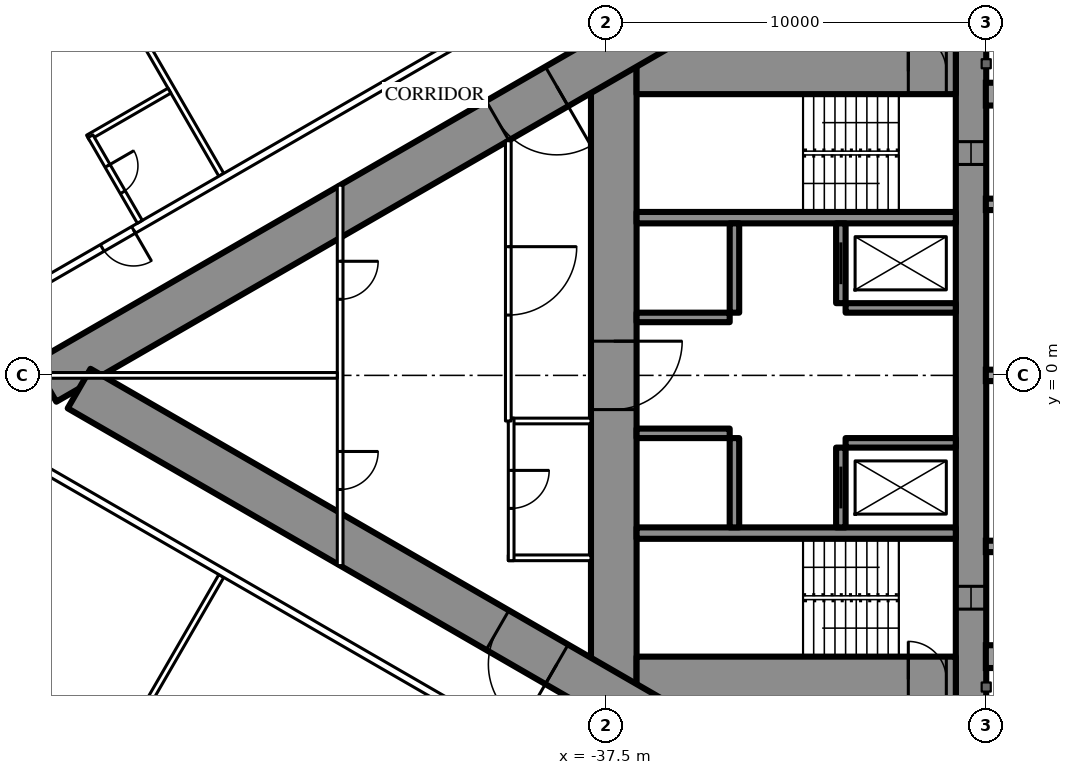
"""IFC4 building model, lengths in metres.
Left out: names, types, materials, properties, quantities, classifications, styles, units other than length and angle.
Written with IfcOpenShell. Run it as: python <this file> out.ifc"""

import sys

from ifc_helpers import new_model, si_unit, direction, frame, frame_2d, origin, place, context, subcontext, project, spatial, rectangle, extrude, element, fill, save


model = new_model("IFC4")
c1 = context("Model", 3, precision=1e-05, world=origin(), true_north=direction((0.0, 1.0)))
c2 = subcontext(c1, "Body", "Model", "MODEL_VIEW")
j1 = project(units=[si_unit("LENGTHUNIT", "METRE"), si_unit("PLANEANGLEUNIT", "RADIAN")], contexts=[c1])
p1 = place(None, origin())
s1 = spatial("IfcSite", under=j1, at=p1, CompositionType="ELEMENT")
p2 = place(p1, origin())
s2 = spatial("IfcBuilding", under=s1, at=p2, CompositionType="ELEMENT")
p3 = place(p2, frame((0.0, 0.0, 63.5)))
s3 = spatial("IfcBuildingStorey", under=s2, at=p3, CompositionType="ELEMENT", Elevation=63.5)
p4 = place(p3, frame((-27.9, 8.6, 0.0), z_axis=(0.0, 0.0, 1.0), x_axis=(0.0, -1.0, 0.0)))
e1 = element("IfcWall", 1, at=p4, inside=s3, PredefinedType="SHEAR", context=c2, shape_type="SweptSolid", body=[
    extrude(rectangle(XDim=17.2, YDim=0.8, at=frame_2d((8.6, 0.0))), origin(), (0.0, 0.0, 1.0), 3.5),
])
p5 = place(p4, frame((2.45, 0.0, 0.6)))
e2 = element("IfcOpeningElement", 2, at=p5, cuts=e1, PredefinedType="OPENING", context=c2, shape_type="SweptSolid", body=[
    extrude(rectangle(XDim=0.6, YDim=2.1, at=frame_2d((0.3, 1.05))), frame((0.0, 0.41, 0.0), z_axis=(0.0, -1.0, 0.0), x_axis=(1.0, 0.0, 0.0)), (0.0, 0.0, 1.0), 0.82),
])
p6 = place(p4, frame((14.15, 0.0, 0.6)))
e3 = element("IfcOpeningElement", 3, at=p6, cuts=e1, PredefinedType="OPENING", context=c2, shape_type="SweptSolid", body=[
    extrude(rectangle(XDim=0.6, YDim=2.1, at=frame_2d((0.3, 1.05))), frame((0.0, 0.41, 0.0), z_axis=(0.0, -1.0, 0.0), x_axis=(1.0, 0.0, 0.0)), (0.0, 0.0, 1.0), 0.82),
])
p7 = place(p3, frame((-37.3, 8.6, 0.0), z_axis=(0.0, 0.0, 1.0), x_axis=(0.0, -1.0, 0.0)))
e4 = element("IfcWall", 4, at=p7, inside=s3, PredefinedType="SHEAR", context=c2, shape_type="SweptSolid", body=[
    extrude(rectangle(XDim=17.2, YDim=1.2, at=frame_2d((8.6, 0.0))), origin(), (0.0, 0.0, 1.0), 3.5),
])
p8 = place(p7, frame((7.7, 0.0, 0.0)))
e5 = element("IfcOpeningElement", 5, at=p8, cuts=e4, PredefinedType="OPENING", context=c2, shape_type="SweptSolid", body=[
    extrude(rectangle(XDim=1.8, YDim=2.2, at=frame_2d((0.9, 1.1))), frame((0.0, 0.61, 0.0), z_axis=(0.0, -1.0, 0.0), x_axis=(1.0, 0.0, 0.0)), (0.0, 0.0, 1.0), 1.22),
])
p9 = place(p3, frame((-28.3, 8.0, 0.0), z_axis=(0.0, 0.0, 1.0), x_axis=(-1.0, 0.0, 0.0)))
e6 = element("IfcWall", 6, at=p9, inside=s3, PredefinedType="SHEAR", context=c2, shape_type="SweptSolid", body=[
    extrude(rectangle(XDim=8.4, YDim=1.2, at=frame_2d((4.2, 0.0))), origin(), (0.0, 0.0, 1.0), 3.5),
])
p10 = place(p9, frame((0.25, 0.0, 0.0)))
e7 = element("IfcOpeningElement", 7, at=p10, cuts=e6, PredefinedType="OPENING", context=c2, shape_type="SweptSolid", body=[
    extrude(rectangle(XDim=1.0, YDim=2.2, at=frame_2d((0.5, 1.1))), frame((0.0, 0.61, 0.0), z_axis=(0.0, -1.0, 0.0), x_axis=(1.0, 0.0, 0.0)), (0.0, 0.0, 1.0), 1.22),
])
p11 = place(p3, frame((-28.3, -8.0, 0.0), z_axis=(0.0, 0.0, 1.0), x_axis=(-1.0, 0.0, 0.0)))
e8 = element("IfcWall", 8, at=p11, inside=s3, PredefinedType="SHEAR", context=c2, shape_type="SweptSolid", body=[
    extrude(rectangle(XDim=8.4, YDim=1.2, at=frame_2d((4.2, 0.0))), origin(), (0.0, 0.0, 1.0), 3.5),
])
p12 = place(p11, frame((0.25, 0.0, 0.0)))
e9 = element("IfcOpeningElement", 9, at=p12, cuts=e8, PredefinedType="OPENING", context=c2, shape_type="SweptSolid", body=[
    extrude(rectangle(XDim=1.0, YDim=2.2, at=frame_2d((0.5, 1.1))), frame((0.0, 0.61, 0.0), z_axis=(0.0, -1.0, 0.0), x_axis=(1.0, 0.0, 0.0)), (0.0, 0.0, 1.0), 1.22),
])
for number, where, z_axis, x_axis in (
    (10, (-28.3, 4.15, 0.0), (0.0, 0.0, 1.0), (-1.0, 0.0, 0.0)),
    (11, (-28.3, -4.15, 0.0), (0.0, 0.0, 1.0), (-1.0, 0.0, 0.0)),
):
    element("IfcWall", number, at=place(p3, frame(where, z_axis=z_axis, x_axis=x_axis)), inside=s3, PredefinedType="SHEAR", context=c2, shape_type="SweptSolid", body=[
        extrude(rectangle(XDim=8.4, YDim=0.3, at=frame_2d((4.2, 0.0))), origin(), (0.0, 0.0, 1.0), 3.5),
    ])
p13 = place(p3, frame((-31.325, 4.0, 0.0), z_axis=(0.0, 0.0, 1.0), x_axis=(0.0, -1.0, 0.0)))
e12 = element("IfcWall", 12, at=p13, inside=s3, PredefinedType="SHEAR", context=c2, shape_type="SweptSolid", body=[
    extrude(rectangle(XDim=2.1, YDim=0.25, at=frame_2d((1.05, 0.0))), origin(), (0.0, 0.0, 1.0), 3.5),
])
p14 = place(p13, frame((0.5, 0.0, 0.0)))
e13 = element("IfcOpeningElement", 13, at=p14, cuts=e12, PredefinedType="OPENING", context=c2, shape_type="SweptSolid", body=[
    extrude(rectangle(XDim=1.1, YDim=2.2, at=frame_2d((0.55, 1.1))), frame((0.0, 0.135, 0.0), z_axis=(0.0, -1.0, 0.0), x_axis=(1.0, 0.0, 0.0)), (0.0, 0.0, 1.0), 0.27),
])
p15 = place(p3, frame((-34.125, 4.0, 0.0), z_axis=(0.0, 0.0, 1.0), x_axis=(0.0, -1.0, 0.0)))
e14 = element("IfcWall", 14, at=p15, inside=s3, PredefinedType="SHEAR", context=c2, shape_type="SweptSolid", body=[
    extrude(rectangle(XDim=2.35, YDim=0.25, at=frame_2d((1.175, 0.0))), origin(), (0.0, 0.0, 1.0), 3.5),
])
p16 = place(p3, frame((-28.3, 1.775, 0.0), z_axis=(0.0, 0.0, 1.0), x_axis=(-1.0, 0.0, 0.0)))
e15 = element("IfcWall", 15, at=p16, inside=s3, PredefinedType="SHEAR", context=c2, shape_type="SweptSolid", body=[
    extrude(rectangle(XDim=2.9, YDim=0.25, at=frame_2d((1.45, 0.0))), origin(), (0.0, 0.0, 1.0), 3.5),
])
p17 = place(p3, frame((-34.25, 1.525, 0.0), z_axis=(0.0, 0.0, 1.0), x_axis=(-1.0, 0.0, 0.0)))
e16 = element("IfcWall", 16, at=p17, inside=s3, PredefinedType="SHEAR", context=c2, shape_type="SweptSolid", body=[
    extrude(rectangle(XDim=2.45, YDim=0.25, at=frame_2d((1.225, 0.0))), origin(), (0.0, 0.0, 1.0), 3.5),
])
p18 = place(p3, frame((-31.325, -1.9, 0.0), z_axis=(0.0, 0.0, 1.0), x_axis=(0.0, -1.0, 0.0)))
e17 = element("IfcWall", 17, at=p18, inside=s3, PredefinedType="SHEAR", context=c2, shape_type="SweptSolid", body=[
    extrude(rectangle(XDim=2.1, YDim=0.25, at=frame_2d((1.05, 0.0))), origin(), (0.0, 0.0, 1.0), 3.5),
])
p19 = place(p18, frame((0.5, 0.0, 0.0)))
e18 = element("IfcOpeningElement", 18, at=p19, cuts=e17, PredefinedType="OPENING", context=c2, shape_type="SweptSolid", body=[
    extrude(rectangle(XDim=1.1, YDim=2.2, at=frame_2d((0.55, 1.1))), frame((0.0, 0.135, 0.0), z_axis=(0.0, -1.0, 0.0), x_axis=(1.0, 0.0, 0.0)), (0.0, 0.0, 1.0), 0.27),
])
p20 = place(p3, frame((-34.125, -1.65, 0.0), z_axis=(0.0, 0.0, 1.0), x_axis=(0.0, -1.0, 0.0)))
e19 = element("IfcWall", 19, at=p20, inside=s3, PredefinedType="SHEAR", context=c2, shape_type="SweptSolid", body=[
    extrude(rectangle(XDim=2.35, YDim=0.25, at=frame_2d((1.175, 0.0))), origin(), (0.0, 0.0, 1.0), 3.5),
])
p21 = place(p3, frame((-28.3, -1.775, 0.0), z_axis=(0.0, 0.0, 1.0), x_axis=(-1.0, 0.0, 0.0)))
e20 = element("IfcWall", 20, at=p21, inside=s3, PredefinedType="SHEAR", context=c2, shape_type="SweptSolid", body=[
    extrude(rectangle(XDim=2.9, YDim=0.25, at=frame_2d((1.45, 0.0))), origin(), (0.0, 0.0, 1.0), 3.5),
])
p22 = place(p3, frame((-34.25, -1.525, 0.0), z_axis=(0.0, 0.0, 1.0), x_axis=(-1.0, 0.0, 0.0)))
e21 = element("IfcWall", 21, at=p22, inside=s3, PredefinedType="SHEAR", context=c2, shape_type="SweptSolid", body=[
    extrude(rectangle(XDim=2.45, YDim=0.25, at=frame_2d((1.225, 0.0))), origin(), (0.0, 0.0, 1.0), 3.5),
])
p23 = place(p3, frame((-27.2, 14.3, 0.0), z_axis=(0.0, 0.0, 1.0), x_axis=(-0.866026593062, -0.499997940104, 0.0)))
e22 = element("IfcWall", 22, at=p23, inside=s3, PredefinedType="SHEAR", context=c2, shape_type="SweptSolid", body=[
    extrude(rectangle(XDim=28.946, YDim=1.2, at=frame_2d((14.473, 0.0))), origin(), (0.0, 0.0, 1.0), 3.5),
])
p24 = place(p23, frame((4.6, 0.0, 0.0)))
e23 = element("IfcOpeningElement", 23, at=p24, cuts=e22, PredefinedType="OPENING", context=c2, shape_type="SweptSolid", body=[
    extrude(rectangle(XDim=1.0, YDim=2.2, at=frame_2d((0.5, 1.1))), frame((0.0, 0.61, 0.0), z_axis=(0.0, -1.0, 0.0), x_axis=(1.0, 0.0, 0.0)), (0.0, 0.0, 1.0), 1.22),
])
p25 = place(p23, frame((13.395, 0.0, 0.0)))
e24 = element("IfcOpeningElement", 24, at=p25, cuts=e22, PredefinedType="OPENING", context=c2, shape_type="SweptSolid", body=[
    extrude(rectangle(XDim=1.8, YDim=2.2, at=frame_2d((0.9, 1.1))), frame((0.0, 0.61, 0.0), z_axis=(0.0, -1.0, 0.0), x_axis=(1.0, 0.0, 0.0)), (0.0, 0.0, 1.0), 1.22),
])
p26 = place(p3, frame((-27.2, -14.3, 0.0), z_axis=(0.0, 0.0, 1.0), x_axis=(-0.866024021859, 0.500002393557, 0.0)))
e25 = element("IfcWall", 25, at=p26, inside=s3, PredefinedType="SHEAR", context=c2, shape_type="SweptSolid", body=[
    extrude(rectangle(XDim=27.907, YDim=1.2, at=frame_2d((13.954, 0.0))), origin(), (0.0, 0.0, 1.0), 3.5),
])
p27 = place(p26, frame((4.6, 0.0, 0.0)))
e26 = element("IfcOpeningElement", 26, at=p27, cuts=e25, PredefinedType="OPENING", context=c2, shape_type="SweptSolid", body=[
    extrude(rectangle(XDim=1.0, YDim=2.2, at=frame_2d((0.5, 1.1))), frame((0.0, 0.61, 0.0), z_axis=(0.0, -1.0, 0.0), x_axis=(1.0, 0.0, 0.0)), (0.0, 0.0, 1.0), 1.22),
])
p28 = place(p26, frame((13.395, 0.0, 0.0)))
e27 = element("IfcOpeningElement", 27, at=p28, cuts=e25, PredefinedType="OPENING", context=c2, shape_type="SweptSolid", body=[
    extrude(rectangle(XDim=1.8, YDim=2.2, at=frame_2d((0.9, 1.1))), frame((0.0, 0.61, 0.0), z_axis=(0.0, -1.0, 0.0), x_axis=(1.0, 0.0, 0.0)), (0.0, 0.0, 1.0), 1.22),
])
for number, where, z_axis, x_axis in (
    (28, (-47.627, 5.278, 0.0), (0.0, 0.0, 1.0), (-0.5, 0.866, 0.0)),
    (29, (-47.627, -5.278, 0.0), (0.0, 0.0, 1.0), (-0.5, -0.866, 0.0)),
):
    element("IfcWall", number, at=place(p3, frame(where, z_axis=z_axis, x_axis=x_axis)), inside=s3, PredefinedType="PARTITIONING", context=c2, shape_type="SweptSolid", body=[
        extrude(rectangle(XDim=9.51, YDim=0.15, at=frame_2d((4.755, 0.0))), origin(), (0.0, 0.0, 1.0), 2.25),
    ])
p29 = place(p3, frame((-37.7, 10.894, 0.0), z_axis=(0.0, 0.0, 1.0), x_axis=(-0.866027905338, -0.499995667157, 0.0)))
e30 = element("IfcWall", 30, at=p29, inside=s3, PredefinedType="PARTITIONING", context=c2, shape_type="SweptSolid", body=[
    extrude(rectangle(XDim=21.787, YDim=0.2, at=frame_2d((10.894, 0.0))), origin(), (0.0, 0.0, 1.0), 3.25),
])
p30 = place(p29, frame((14.13, 0.0, 0.0)))
e31 = element("IfcOpeningElement", 31, at=p30, cuts=e30, PredefinedType="OPENING", context=c2, shape_type="SweptSolid", body=[
    extrude(rectangle(XDim=0.95, YDim=2.2, at=frame_2d((0.475, 1.1))), frame((0.0, 0.11, 0.0), z_axis=(0.0, -1.0, 0.0), x_axis=(1.0, 0.0, 0.0)), (0.0, 0.0, 1.0), 0.22),
])
p31 = place(p29, frame((20.058, 0.0, 0.0)))
e32 = element("IfcOpeningElement", 32, at=p31, cuts=e30, PredefinedType="OPENING", context=c2, shape_type="SweptSolid", body=[
    extrude(rectangle(XDim=0.95, YDim=2.2, at=frame_2d((0.475, 1.1))), frame((0.0, 0.11, 0.0), z_axis=(0.0, -1.0, 0.0), x_axis=(1.0, 0.0, 0.0)), (0.0, 0.0, 1.0), 0.22),
])
p32 = place(p29, frame((0.6, 0.0, 0.0)))
e33 = element("IfcOpeningElement", 33, at=p32, cuts=e30, PredefinedType="OPENING", context=c2, shape_type="SweptSolid", body=[
    extrude(rectangle(XDim=0.95, YDim=2.2, at=frame_2d((0.475, 1.1))), frame((0.0, 0.11, 0.0), z_axis=(0.0, -1.0, 0.0), x_axis=(1.0, 0.0, 0.0)), (0.0, 0.0, 1.0), 0.22),
])
p33 = place(p3, frame((-36.92, -11.344, 0.0), z_axis=(0.0, 0.0, 1.0), x_axis=(-0.866028313256, 0.499994960614, 0.0)))
e34 = element("IfcWall", 34, at=p33, inside=s3, PredefinedType="PARTITIONING", context=c2, shape_type="SweptSolid", body=[
    extrude(rectangle(XDim=22.568, YDim=0.2, at=frame_2d((11.284, 0.0))), origin(), (0.0, 0.0, 1.0), 3.25),
])
p34 = place(p33, frame((18.668, 0.0, 0.0)))
e35 = element("IfcOpeningElement", 35, at=p34, cuts=e34, PredefinedType="OPENING", context=c2, shape_type="SweptSolid", body=[
    extrude(rectangle(XDim=0.95, YDim=2.2, at=frame_2d((0.475, 1.1))), frame((0.0, 0.11, 0.0), z_axis=(0.0, -1.0, 0.0), x_axis=(1.0, 0.0, 0.0)), (0.0, 0.0, 1.0), 0.22),
])
p35 = place(p33, frame((3.35, 0.0, 0.0)))
e36 = element("IfcOpeningElement", 36, at=p35, cuts=e34, PredefinedType="OPENING", context=c2, shape_type="SweptSolid", body=[
    extrude(rectangle(XDim=1.0, YDim=2.2, at=frame_2d((0.5, 1.1))), frame((0.0, 0.11, 0.0), z_axis=(0.0, -1.0, 0.0), x_axis=(1.0, 0.0, 0.0)), (0.0, 0.0, 1.0), 0.22),
])
p36 = place(p3, frame((-48.992, 7.492, 0.0), z_axis=(0.0, 0.0, 1.0), x_axis=(-0.866031185235, -0.4999899861, 0.0)))
e37 = element("IfcWall", 37, at=p36, inside=s3, PredefinedType="PARTITIONING", context=c2, shape_type="SweptSolid", body=[
    extrude(rectangle(XDim=2.475, YDim=0.15, at=frame_2d((1.238, 0.0))), origin(), (0.0, 0.0, 1.0), 3.25),
])
p37 = place(p3, frame((-49.77, 4.04, 0.0), z_axis=(0.0, 0.0, 1.0), x_axis=(-0.500006934395, 0.866021400173, 0.0)))
e38 = element("IfcWall", 38, at=p37, inside=s3, PredefinedType="PARTITIONING", context=c2, shape_type="SweptSolid", body=[
    extrude(rectangle(XDim=2.6, YDim=0.15, at=frame_2d((1.3, 0.0))), origin(), (0.0, 0.0, 1.0), 3.25),
])
p38 = place(p37, frame((0.9, 0.0, 0.0)))
e39 = element("IfcOpeningElement", 39, at=p38, cuts=e38, PredefinedType="OPENING", context=c2, shape_type="SweptSolid", body=[
    extrude(rectangle(XDim=0.8, YDim=2.2, at=frame_2d((0.4, 1.1))), frame((0.0, 0.085, 0.0), z_axis=(0.0, -1.0, 0.0), x_axis=(1.0, 0.0, 0.0)), (0.0, 0.0, 1.0), 0.17),
])
for number, where, z_axis, x_axis in (
    (40, (-37.9, -1.2, 0.0), (0.0, 0.0, 1.0), (-1.0, 0.0, 0.0)),
    (41, (-37.9, -4.8, 0.0), (0.0, 0.0, 1.0), (-1.0, 0.0, 0.0)),
):
    element("IfcWall", number, at=place(p3, frame(where, z_axis=z_axis, x_axis=x_axis)), inside=s3, PredefinedType="PARTITIONING", context=c2, shape_type="SweptSolid", body=[
        extrude(rectangle(XDim=2.175, YDim=0.15, at=frame_2d((1.087, 0.0))), origin(), (0.0, 0.0, 1.0), 3.25),
    ])
p39 = place(p3, frame((-40.0, -1.125, 0.0), z_axis=(0.0, 0.0, 1.0), x_axis=(0.0, -1.0, 0.0)))
e42 = element("IfcWall", 42, at=p39, inside=s3, PredefinedType="PARTITIONING", context=c2, shape_type="SweptSolid", body=[
    extrude(rectangle(XDim=3.75, YDim=0.15, at=frame_2d((1.875, 0.0))), origin(), (0.0, 0.0, 1.0), 3.25),
])
p40 = place(p39, frame((1.375, 0.0, 0.0)))
e43 = element("IfcOpeningElement", 43, at=p40, cuts=e42, PredefinedType="OPENING", context=c2, shape_type="SweptSolid", body=[
    extrude(rectangle(XDim=1.0, YDim=2.2, at=frame_2d((0.5, 1.1))), frame((0.0, 0.085, 0.0), z_axis=(0.0, -1.0, 0.0), x_axis=(1.0, 0.0, 0.0)), (0.0, 0.0, 1.0), 0.17),
])
p41 = place(p3, frame((-40.075, 6.174, 0.0), z_axis=(0.0, 0.0, 1.0), x_axis=(0.0, -1.0, 0.0)))
e44 = element("IfcWall", 44, at=p41, inside=s3, PredefinedType="PARTITIONING", context=c2, shape_type="SweptSolid", body=[
    extrude(rectangle(XDim=7.374, YDim=0.15, at=frame_2d((3.687, 0.0))), origin(), (0.0, 0.0, 1.0), 3.25),
])
p42 = place(p41, frame((2.787, 0.0, 0.0)))
e45 = element("IfcOpeningElement", 45, at=p42, cuts=e44, PredefinedType="OPENING", context=c2, shape_type="SweptSolid", body=[
    extrude(rectangle(XDim=1.8, YDim=2.2, at=frame_2d((0.9, 1.1))), frame((0.0, 0.085, 0.0), z_axis=(0.0, -1.0, 0.0), x_axis=(1.0, 0.0, 0.0)), (0.0, 0.0, 1.0), 0.17),
])
p43 = place(p3, frame((-44.5, 5.005, 0.0), z_axis=(0.0, 0.0, 1.0), x_axis=(0.0, -1.0, 0.0)))
e46 = element("IfcWall", 46, at=p43, inside=s3, PredefinedType="PARTITIONING", context=c2, shape_type="SweptSolid", body=[
    extrude(rectangle(XDim=10.009, YDim=0.15, at=frame_2d((5.005, 0.0))), origin(), (0.0, 0.0, 1.0), 2.45),
])
p44 = place(p43, frame((2.002, 0.0, 0.0)))
e47 = element("IfcOpeningElement", 47, at=p44, cuts=e46, PredefinedType="OPENING", context=c2, shape_type="SweptSolid", body=[
    extrude(rectangle(XDim=1.0, YDim=2.2, at=frame_2d((0.5, 1.1))), frame((0.0, 0.085, 0.0), z_axis=(0.0, -1.0, 0.0), x_axis=(1.0, 0.0, 0.0)), (0.0, 0.0, 1.0), 0.17),
])
p45 = place(p43, frame((7.007, 0.0, 0.0)))
e48 = element("IfcOpeningElement", 48, at=p45, cuts=e46, PredefinedType="OPENING", context=c2, shape_type="SweptSolid", body=[
    extrude(rectangle(XDim=1.0, YDim=2.2, at=frame_2d((0.5, 1.1))), frame((0.0, 0.085, 0.0), z_axis=(0.0, -1.0, 0.0), x_axis=(1.0, 0.0, 0.0)), (0.0, 0.0, 1.0), 0.17),
])
p46 = place(p3, frame((-44.575, 0.0, 0.0), z_axis=(0.0, 0.0, 1.0), x_axis=(-1.0, 0.0, 0.0)))
e49 = element("IfcWall", 49, at=p46, inside=s3, PredefinedType="PARTITIONING", context=c2, shape_type="SweptSolid", body=[
    extrude(rectangle(XDim=8.593, YDim=0.15, at=frame_2d((4.297, 0.0))), origin(), (0.0, 0.0, 1.0), 2.25),
])
p47 = place(p38, origin())
e50 = element("IfcDoor", 50, at=p47, inside=s3, OperationType="SINGLE_SWING_RIGHT", PredefinedType="DOOR", context=c2, shape_type="SweptSolid", body=[
    extrude(rectangle(XDim=0.8, YDim=2.2, at=frame_2d((0.4, 1.1))), frame((0.0, 0.025, 0.0), z_axis=(0.0, -1.0, 0.0), x_axis=(1.0, 0.0, 0.0)), (0.0, 0.0, 1.0), 0.05),
])
fill(e39, e50)
p48 = place(p30, origin())
e51 = element("IfcDoor", 51, at=p48, inside=s3, OperationType="SINGLE_SWING_LEFT", PredefinedType="DOOR", context=c2, shape_type="SweptSolid", body=[
    extrude(rectangle(XDim=0.95, YDim=2.2, at=frame_2d((0.475, 1.1))), frame((0.0, 0.025, 0.0), z_axis=(0.0, -1.0, 0.0), x_axis=(1.0, 0.0, 0.0)), (0.0, 0.0, 1.0), 0.05),
])
fill(e31, e51)
p49 = place(p40, origin())
e52 = element("IfcDoor", 52, at=p49, inside=s3, OperationType="SINGLE_SWING_LEFT", PredefinedType="DOOR", context=c2, shape_type="SweptSolid", body=[
    extrude(rectangle(XDim=1.0, YDim=2.2, at=frame_2d((0.5, 1.1))), frame((0.0, 0.025, 0.0), z_axis=(0.0, -1.0, 0.0), x_axis=(1.0, 0.0, 0.0)), (0.0, 0.0, 1.0), 0.05),
])
fill(e43, e52)
p50 = place(p42, origin())
e53 = element("IfcDoor", 53, at=p50, inside=s3, OperationType="DOUBLE_DOOR_SINGLE_SWING", PredefinedType="DOOR", context=c2, shape_type="SweptSolid", body=[
    extrude(rectangle(XDim=1.8, YDim=2.2, at=frame_2d((0.9, 1.1))), frame((0.0, 0.025, 0.0), z_axis=(0.0, -1.0, 0.0), x_axis=(1.0, 0.0, 0.0)), (0.0, 0.0, 1.0), 0.05),
])
fill(e45, e53)
p51 = place(p44, origin())
e54 = element("IfcDoor", 54, at=p51, inside=s3, OperationType="SINGLE_SWING_LEFT", PredefinedType="DOOR", context=c2, shape_type="SweptSolid", body=[
    extrude(rectangle(XDim=1.0, YDim=2.2, at=frame_2d((0.5, 1.1))), frame((0.0, 0.025, 0.0), z_axis=(0.0, -1.0, 0.0), x_axis=(1.0, 0.0, 0.0)), (0.0, 0.0, 1.0), 0.05),
])
fill(e47, e54)
p52 = place(p45, origin())
e55 = element("IfcDoor", 55, at=p52, inside=s3, OperationType="SINGLE_SWING_LEFT", PredefinedType="DOOR", context=c2, shape_type="SweptSolid", body=[
    extrude(rectangle(XDim=1.0, YDim=2.2, at=frame_2d((0.5, 1.1))), frame((0.0, 0.025, 0.0), z_axis=(0.0, -1.0, 0.0), x_axis=(1.0, 0.0, 0.0)), (0.0, 0.0, 1.0), 0.05),
])
fill(e48, e55)
p53 = place(p25, origin())
e56 = element("IfcDoor", 56, at=p53, inside=s3, OperationType="DOUBLE_DOOR_SINGLE_SWING", PredefinedType="DOOR", context=c2, shape_type="SweptSolid", body=[
    extrude(rectangle(XDim=1.8, YDim=2.2, at=frame_2d((0.9, 1.1))), frame((0.0, 0.025, 0.0), z_axis=(0.0, -1.0, 0.0), x_axis=(1.0, 0.0, 0.0)), (0.0, 0.0, 1.0), 0.05),
])
fill(e24, e56)
p54 = place(p28, origin())
e57 = element("IfcDoor", 57, at=p54, inside=s3, OperationType="DOUBLE_DOOR_SINGLE_SWING", PredefinedType="DOOR", context=c2, shape_type="SweptSolid", body=[
    extrude(rectangle(XDim=1.8, YDim=2.2, at=frame_2d((0.9, 1.1))), frame((0.0, 0.025, 0.0), z_axis=(0.0, -1.0, 0.0), x_axis=(1.0, 0.0, 0.0)), (0.0, 0.0, 1.0), 0.05),
])
fill(e27, e57)
p55 = place(p8, origin())
e58 = element("IfcDoor", 58, at=p55, inside=s3, OperationType="DOUBLE_DOOR_SINGLE_SWING", PredefinedType="DOOR", context=c2, shape_type="SweptSolid", body=[
    extrude(rectangle(XDim=1.8, YDim=2.2, at=frame_2d((0.9, 1.1))), frame((0.0, 0.025, 0.0), z_axis=(0.0, -1.0, 0.0), x_axis=(1.0, 0.0, 0.0)), (0.0, 0.0, 1.0), 0.05),
])
fill(e5, e58)
p56 = place(p10, origin())
e59 = element("IfcDoor", 59, at=p56, inside=s3, OperationType="SINGLE_SWING_RIGHT", PredefinedType="DOOR", context=c2, shape_type="SweptSolid", body=[
    extrude(rectangle(XDim=1.0, YDim=2.2, at=frame_2d((0.5, 1.1))), frame((0.0, 0.025, 0.0), z_axis=(0.0, -1.0, 0.0), x_axis=(1.0, 0.0, 0.0)), (0.0, 0.0, 1.0), 0.05),
])
fill(e7, e59)
p57 = place(p12, origin())
e60 = element("IfcDoor", 60, at=p57, inside=s3, OperationType="SINGLE_SWING_RIGHT", PredefinedType="DOOR", context=c2, shape_type="SweptSolid", body=[
    extrude(rectangle(XDim=1.0, YDim=2.2, at=frame_2d((0.5, 1.1))), frame((0.0, 0.025, 0.0), z_axis=(0.0, -1.0, 0.0), x_axis=(1.0, 0.0, 0.0)), (0.0, 0.0, 1.0), 0.05),
])
fill(e9, e60)
p58 = place(p14, origin())
e61 = element("IfcDoor", 61, at=p58, inside=s3, OperationType="SLIDING_TO_LEFT", PredefinedType="USERDEFINED", context=c2, shape_type="SweptSolid", body=[
    extrude(rectangle(XDim=1.1, YDim=2.2, at=frame_2d((0.55, 1.1))), frame((0.0, 0.025, 0.0), z_axis=(0.0, -1.0, 0.0), x_axis=(1.0, 0.0, 0.0)), (0.0, 0.0, 1.0), 0.05),
])
fill(e13, e61)
p59 = place(p19, origin())
e62 = element("IfcDoor", 62, at=p59, inside=s3, OperationType="SLIDING_TO_LEFT", PredefinedType="USERDEFINED", context=c2, shape_type="SweptSolid", body=[
    extrude(rectangle(XDim=1.1, YDim=2.2, at=frame_2d((0.55, 1.1))), frame((0.0, 0.025, 0.0), z_axis=(0.0, -1.0, 0.0), x_axis=(1.0, 0.0, 0.0)), (0.0, 0.0, 1.0), 0.05),
])
fill(e18, e62)
p60 = place(p5, origin())
e63 = element("IfcWindow", 63, at=p60, inside=s3, PartitioningType="SINGLE_PANEL", PredefinedType="WINDOW", context=c2, shape_type="SweptSolid", body=[
    extrude(rectangle(XDim=0.6, YDim=2.1, at=frame_2d((0.3, 1.05))), frame((0.0, 0.03, 0.0), z_axis=(0.0, -1.0, 0.0), x_axis=(1.0, 0.0, 0.0)), (0.0, 0.0, 1.0), 0.06),
])
fill(e2, e63)
p61 = place(p6, origin())
e64 = element("IfcWindow", 64, at=p61, inside=s3, PartitioningType="SINGLE_PANEL", PredefinedType="WINDOW", context=c2, shape_type="SweptSolid", body=[
    extrude(rectangle(XDim=0.6, YDim=2.1, at=frame_2d((0.3, 1.05))), frame((0.0, 0.03, 0.0), z_axis=(0.0, -1.0, 0.0), x_axis=(1.0, 0.0, 0.0)), (0.0, 0.0, 1.0), 0.06),
])
fill(e3, e64)
save(model, sys.argv[1])
